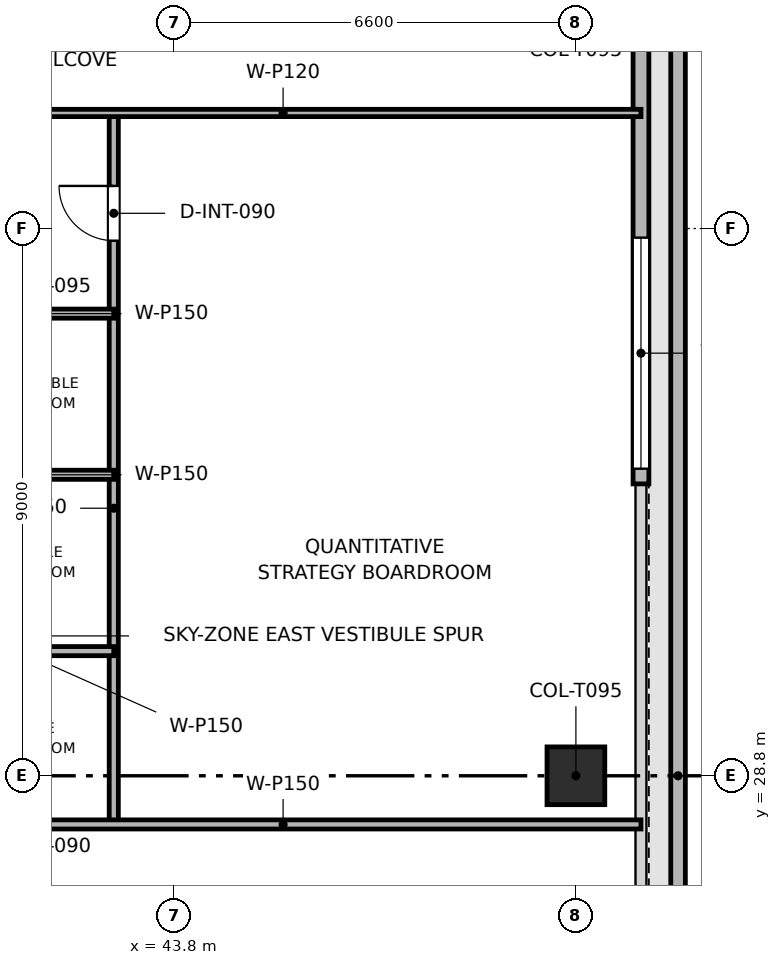
"""IFC4 building model, lengths in metres.
Left out: names, types, materials, properties, quantities, classifications, styles, units other than length and angle.
Written with IfcOpenShell. Run it as: python <this file> out.ifc"""

import sys

from ifc_helpers import new_model, si_unit, direction, frame, frame_2d, origin, origin_2d, place, context, subcontext, project, spatial, rectangle, extrude, element, fill, save


model = new_model("IFC4")
c1 = context("Model", 3, precision=1e-05, world=origin(), true_north=direction((0.0, 1.0)))
c2 = subcontext(c1, "Body", "Model", "MODEL_VIEW")
j1 = project(units=[si_unit("LENGTHUNIT", "METRE"), si_unit("PLANEANGLEUNIT", "RADIAN")], contexts=[c1])
p1 = place(None, origin())
s1 = spatial("IfcSite", under=j1, at=p1, CompositionType="ELEMENT")
p2 = place(p1, origin())
s2 = spatial("IfcBuilding", under=s1, at=p2, CompositionType="ELEMENT")
p3 = place(p2, frame((0.0, 0.0, 295.5)))
s3 = spatial("IfcBuildingStorey", under=s2, at=p3, CompositionType="ELEMENT", Elevation=295.5)
p4 = place(p3, frame((50.4, 28.8, 0.003), z_axis=(0.0, 0.0, 1.0), x_axis=(1.0, 0.0, 0.0)))
e1 = element("IfcColumn", 1, at=p4, inside=s3, PredefinedType="COLUMN", context=c2, shape_type="SweptSolid", body=[
    extrude(rectangle(XDim=0.95, YDim=0.95, at=origin_2d()), origin(), (0.0, 0.0, 1.0), 3.504),
])
p5 = place(p3, frame((52.08, 12.255, 0.0), z_axis=(0.0, 0.0, 1.0), x_axis=(0.0, 1.0, 0.0)))
e2 = element("IfcWall", 2, at=p5, inside=s3, PredefinedType="PARAPET", context=c2, shape_type="SweptSolid", body=[
    extrude(rectangle(XDim=33.09, YDim=0.24, at=frame_2d((16.545, 0.0))), origin(), (0.0, 0.0, 1.0), 1.2),
])
p6 = place(p3, frame((51.47, 45.3, 0.0), z_axis=(0.0, 0.0, 1.0), x_axis=(0.0, -1.0, 0.0)))
e3 = element("IfcWall", 3, at=p6, inside=s3, PredefinedType="SOLIDWALL", context=c2, shape_type="SweptSolid", body=[
    extrude(rectangle(XDim=11.7, YDim=0.26, at=frame_2d((5.85, 0.0))), origin(), (0.0, 0.0, 1.0), 3.51),
])
p7 = place(p6, frame((7.65, 0.0, 0.9)))
e4 = element("IfcOpeningElement", 4, at=p7, cuts=e3, PredefinedType="OPENING", context=c2, shape_type="SweptSolid", body=[
    extrude(rectangle(XDim=3.8, YDim=1.9, at=frame_2d((1.9, 0.95))), frame((0.0, 0.14, 0.0), z_axis=(0.0, -1.0, 0.0), x_axis=(1.0, 0.0, 0.0)), (0.0, 0.0, 1.0), 0.28),
])
p8 = place(p3, frame((42.8, 28.0, 0.0), z_axis=(0.0, 0.0, 1.0), x_axis=(0.0, 1.0, 0.0)))
e5 = element("IfcWall", 5, at=p8, inside=s3, PredefinedType="PARTITIONING", context=c2, shape_type="SweptSolid", body=[
    extrude(rectangle(XDim=11.7, YDim=0.15, at=frame_2d((5.85, 0.0))), origin(), (0.0, 0.0, 1.0), 3.095),
])
p9 = place(p8, frame((9.6, 0.0, 0.0)))
e6 = element("IfcOpeningElement", 6, at=p9, cuts=e5, PredefinedType="OPENING", context=c2, shape_type="SweptSolid", body=[
    extrude(rectangle(XDim=0.9, YDim=2.1, at=frame_2d((0.45, 1.05))), frame((0.0, 0.085, 0.0), z_axis=(0.0, -1.0, 0.0), x_axis=(1.0, 0.0, 0.0)), (0.0, 0.0, 1.0), 0.17),
])
p10 = place(p3, frame((39.7, 28.0, 0.0), z_axis=(0.0, 0.0, 1.0), x_axis=(1.0, 0.0, 0.0)))
e7 = element("IfcWall", 7, at=p10, inside=s3, PredefinedType="PARTITIONING", context=c2, shape_type="SweptSolid", body=[
    extrude(rectangle(XDim=11.77, YDim=0.15, at=frame_2d((5.885, 0.0))), origin(), (0.0, 0.0, 1.0), 3.135),
])
for number, where, z_axis, x_axis in (
    (8, (39.7, 36.4, 0.0), (0.0, 0.0, 1.0), (1.0, 0.0, 0.0)),
    (9, (39.7, 30.85, 0.0), (0.0, 0.0, 1.0), (1.0, 0.0, 0.0)),
    (10, (39.7, 33.75, 0.0), (0.0, 0.0, 1.0), (1.0, 0.0, 0.0)),
):
    element("IfcWall", number, at=place(p3, frame(where, z_axis=z_axis, x_axis=x_axis)), inside=s3, PredefinedType="PARTITIONING", context=c2, shape_type="SweptSolid", body=[
        extrude(rectangle(XDim=3.1, YDim=0.15, at=frame_2d((1.55, 0.0))), origin(), (0.0, 0.0, 1.0), 3.135),
    ])
p11 = place(p3, frame((39.7, 39.7, 0.0), z_axis=(0.0, 0.0, 1.0), x_axis=(1.0, 0.0, 0.0)))
e11 = element("IfcWall", 11, at=p11, inside=s3, PredefinedType="PARTITIONING", context=c2, shape_type="SweptSolid", body=[
    extrude(rectangle(XDim=11.77, YDim=0.12, at=frame_2d((5.885, 0.0))), origin(), (0.0, 0.0, 1.0), 3.095),
])
p12 = place(p7, origin())
e12 = element("IfcWindow", 12, at=p12, inside=s3, PartitioningType="SINGLE_PANEL", PredefinedType="WINDOW", context=c2, shape_type="SweptSolid", body=[
    extrude(rectangle(XDim=3.8, YDim=1.9, at=frame_2d((1.9, 0.95))), frame((0.0, 0.03, 0.0), z_axis=(0.0, -1.0, 0.0), x_axis=(1.0, 0.0, 0.0)), (0.0, 0.0, 1.0), 0.06),
])
fill(e4, e12)
p13 = place(p9, origin())
e13 = element("IfcDoor", 13, at=p13, inside=s3, OperationType="SINGLE_SWING_RIGHT", PredefinedType="DOOR", context=c2, shape_type="SweptSolid", body=[
    extrude(rectangle(XDim=0.9, YDim=2.1, at=frame_2d((0.45, 1.05))), frame((0.0, 0.025, 0.0), z_axis=(0.0, -1.0, 0.0), x_axis=(1.0, 0.0, 0.0)), (0.0, 0.0, 1.0), 0.05),
])
fill(e6, e13)
save(model, sys.argv[1])
